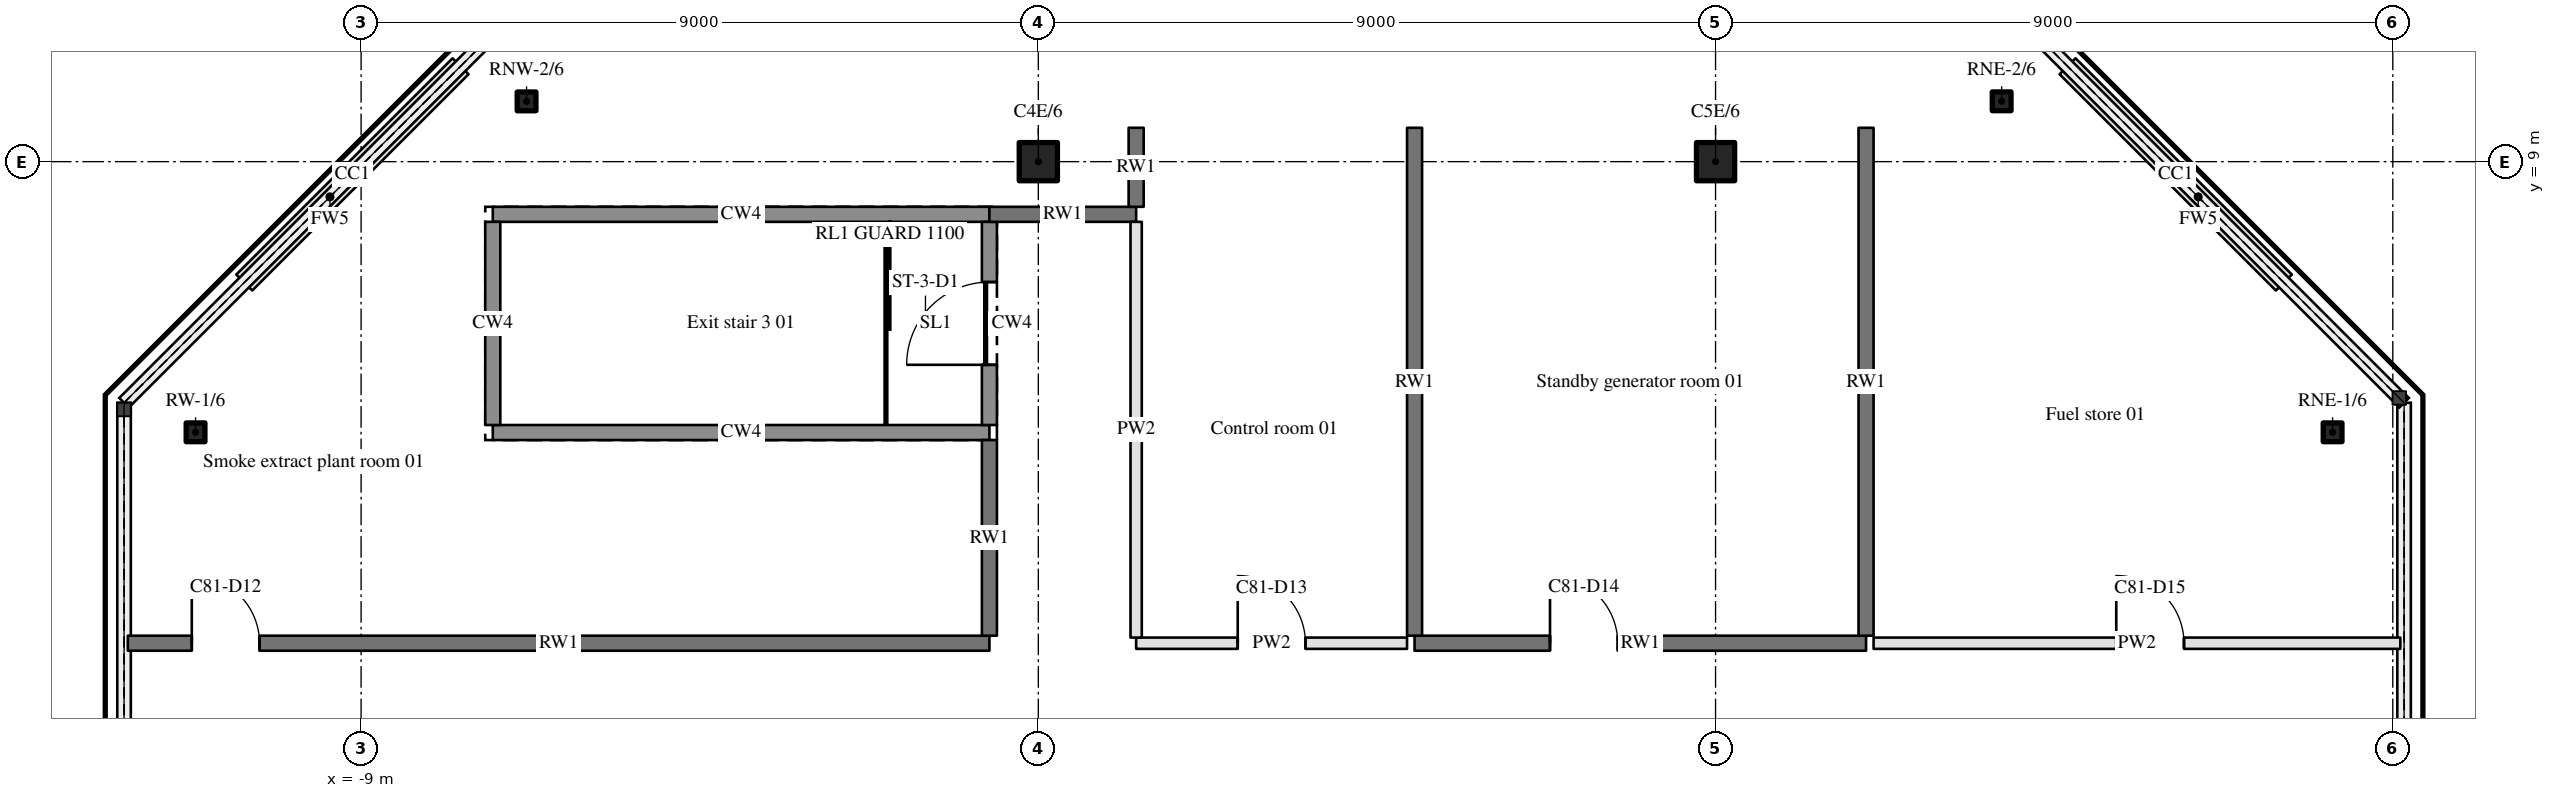
"""IFC4 building model, lengths in metres.
Left out: names, types, materials, properties, quantities, classifications, styles, units other than length and angle.
Written with IfcOpenShell. Run it as: python <this file> out.ifc"""

import sys

from ifc_helpers import new_model, si_unit, direction, frame, frame_2d, origin, origin_2d, place, context, subcontext, project, spatial, rectangle, hollow_rectangle, hollow_circle, extrude, element, fill, save


model = new_model("IFC4")
c1 = context("Model", 3, precision=1e-05, world=origin(), true_north=direction((0.0, 1.0)))
c2 = subcontext(c1, "Body", "Model", "MODEL_VIEW")
j1 = project(units=[si_unit("LENGTHUNIT", "METRE"), si_unit("PLANEANGLEUNIT", "RADIAN")], contexts=[c1])
p1 = place(None, origin())
s1 = spatial("IfcSite", under=j1, at=p1, CompositionType="ELEMENT")
p2 = place(p1, origin())
s2 = spatial("IfcBuilding", under=s1, at=p2, CompositionType="ELEMENT")
p3 = place(p2, frame((0.0, 0.0, 300.9)))
s3 = spatial("IfcBuildingStorey", under=s2, at=p3, CompositionType="ELEMENT", Elevation=300.9)
for number, where, z_axis, x_axis in (
    (1, (0.0, 9.0, 0.0), (0.0, 0.0, 1.0), (1.0, 0.0, 0.0)),
    (2, (9.0, 9.0, 0.0), (0.0, 0.0, 1.0), (1.0, 0.0, 0.0)),
):
    element("IfcColumn", number, at=place(p3, frame(where, z_axis=z_axis, x_axis=x_axis)), inside=s3, PredefinedType="COLUMN", context=c2, shape_type="SweptSolid", body=[
        extrude(hollow_circle(Radius=0.254, WallThickness=0.025, at=origin_2d()), origin(), (0.0, 0.0, 1.0), 3.6),
    ])
p4 = place(p3, frame((17.2, 5.403, 0.0), z_axis=(0.0, 0.0, 1.0), x_axis=(1.0, 0.0, 0.0)))
e3 = element("IfcColumn", 3, at=p4, inside=s3, PredefinedType="COLUMN", context=c2, shape_type="SweptSolid", body=[
    extrude(hollow_rectangle(XDim=0.25, YDim=0.25, WallThickness=0.02, InnerFilletRadius=0.03, OuterFilletRadius=0.05, at=origin_2d()), origin(), (0.0, 0.0, 1.0), 3.6),
])
p5 = place(p3, frame((12.802, 9.802, 0.0), z_axis=(0.0, 0.0, 1.0), x_axis=(1.0, 0.0, 0.0)))
e4 = element("IfcColumn", 4, at=p5, inside=s3, PredefinedType="COLUMN", context=c2, shape_type="SweptSolid", body=[
    extrude(hollow_rectangle(XDim=0.25, YDim=0.25, WallThickness=0.02, InnerFilletRadius=0.03, OuterFilletRadius=0.05, at=origin_2d()), origin(), (0.0, 0.0, 1.0), 3.253),
])
p6 = place(p3, frame((-6.801, 9.801, 0.0), z_axis=(0.0, 0.0, 1.0), x_axis=(1.0, 0.0, 0.0)))
e5 = element("IfcColumn", 5, at=p6, inside=s3, PredefinedType="COLUMN", context=c2, shape_type="SweptSolid", body=[
    extrude(hollow_rectangle(XDim=0.25, YDim=0.25, WallThickness=0.02, InnerFilletRadius=0.03, OuterFilletRadius=0.05, at=origin_2d()), origin(), (0.0, 0.0, 1.0), 3.254),
])
p7 = place(p3, frame((-11.2, 5.403, 0.0), z_axis=(0.0, 0.0, 1.0), x_axis=(1.0, 0.0, 0.0)))
e6 = element("IfcColumn", 6, at=p7, inside=s3, PredefinedType="COLUMN", context=c2, shape_type="SweptSolid", body=[
    extrude(hollow_rectangle(XDim=0.25, YDim=0.25, WallThickness=0.02, InnerFilletRadius=0.03, OuterFilletRadius=0.05, at=origin_2d()), origin(), (0.0, 0.0, 1.0), 3.6),
])
p8 = place(p3, frame((-12.1, 2.6, 0.0), z_axis=(0.0, 0.0, 1.0), x_axis=(1.0, 0.0, 0.0)))
e7 = element("IfcWall", 7, at=p8, inside=s3, PredefinedType="SOLIDWALL", context=c2, shape_type="SweptSolid", body=[
    extrude(rectangle(XDim=11.45, YDim=0.2, at=frame_2d((5.725, 0.0))), origin(), (0.0, 0.0, 1.0), 2.66),
])
p9 = place(p8, frame((0.85, 0.0, 0.0)))
e8 = element("IfcOpeningElement", 8, at=p9, cuts=e7, PredefinedType="OPENING", context=c2, shape_type="SweptSolid", body=[
    extrude(rectangle(XDim=0.9, YDim=2.1, at=frame_2d((0.45, 1.05))), frame((0.0, 0.11, 0.0), z_axis=(0.0, -1.0, 0.0), x_axis=(1.0, 0.0, 0.0)), (0.0, 0.0, 1.0), 0.22),
])
p10 = place(p3, frame((1.3, 2.6, 0.0), z_axis=(0.0, 0.0, 1.0), x_axis=(1.0, 0.0, 0.0)))
e9 = element("IfcWall", 9, at=p10, inside=s3, PredefinedType="PARTITIONING", context=c2, shape_type="SweptSolid", body=[
    extrude(rectangle(XDim=3.6, YDim=0.15, at=frame_2d((1.8, 0.0))), origin(), (0.0, 0.0, 1.0), 2.66),
])
p11 = place(p10, frame((1.35, 0.0, 0.0)))
e10 = element("IfcOpeningElement", 10, at=p11, cuts=e9, PredefinedType="OPENING", context=c2, shape_type="SweptSolid", body=[
    extrude(rectangle(XDim=0.9, YDim=2.1, at=frame_2d((0.45, 1.05))), frame((0.0, 0.085, 0.0), z_axis=(0.0, -1.0, 0.0), x_axis=(1.0, 0.0, 0.0)), (0.0, 0.0, 1.0), 0.17),
])
p12 = place(p3, frame((5.0, 2.6, 0.0), z_axis=(0.0, 0.0, 1.0), x_axis=(1.0, 0.0, 0.0)))
e11 = element("IfcWall", 11, at=p12, inside=s3, PredefinedType="SOLIDWALL", context=c2, shape_type="SweptSolid", body=[
    extrude(rectangle(XDim=6.0, YDim=0.2, at=frame_2d((3.0, 0.0))), origin(), (0.0, 0.0, 1.0), 2.66),
])
p13 = place(p12, frame((1.8, 0.0, 0.0)))
e12 = element("IfcOpeningElement", 12, at=p13, cuts=e11, PredefinedType="OPENING", context=c2, shape_type="SweptSolid", body=[
    extrude(rectangle(XDim=0.9, YDim=2.1, at=frame_2d((0.45, 1.05))), frame((0.0, 0.11, 0.0), z_axis=(0.0, -1.0, 0.0), x_axis=(1.0, 0.0, 0.0)), (0.0, 0.0, 1.0), 0.22),
])
p14 = place(p3, frame((11.1, 2.6, 0.0), z_axis=(0.0, 0.0, 1.0), x_axis=(1.0, 0.0, 0.0)))
e13 = element("IfcWall", 13, at=p14, inside=s3, PredefinedType="PARTITIONING", context=c2, shape_type="SweptSolid", body=[
    extrude(rectangle(XDim=7.0, YDim=0.15, at=frame_2d((3.5, 0.0))), origin(), (0.0, 0.0, 1.0), 2.66),
])
p15 = place(p14, frame((3.225, 0.0, 0.0)))
e14 = element("IfcOpeningElement", 14, at=p15, cuts=e13, PredefinedType="OPENING", context=c2, shape_type="SweptSolid", body=[
    extrude(rectangle(XDim=0.9, YDim=2.1, at=frame_2d((0.45, 1.05))), frame((0.0, 0.085, 0.0), z_axis=(0.0, -1.0, 0.0), x_axis=(1.0, 0.0, 0.0)), (0.0, 0.0, 1.0), 0.17),
])
for number, where, z_axis, x_axis in (
    (15, (-7.25, 5.4, 0.0), (0.0, 0.0, 1.0), (1.0, 0.0, 0.0)),
    (16, (-7.25, 8.3, 0.0), (0.0, 0.0, 1.0), (1.0, 0.0, 0.0)),
):
    element("IfcWall", number, at=place(p3, frame(where, z_axis=z_axis, x_axis=x_axis)), inside=s3, PredefinedType="SHEAR", context=c2, shape_type="SweptSolid", body=[
        extrude(rectangle(XDim=6.6, YDim=0.2, at=frame_2d((3.3, 0.0))), origin(), (0.0, 0.0, 1.0), 3.6),
    ])
p16 = place(p3, frame((-0.65, 8.3, 0.0), z_axis=(0.0, 0.0, 1.0), x_axis=(1.0, 0.0, 0.0)))
e17 = element("IfcWall", 17, at=p16, inside=s3, PredefinedType="SOLIDWALL", context=c2, shape_type="SweptSolid", body=[
    extrude(rectangle(XDim=1.95, YDim=0.2, at=frame_2d((0.975, 0.0))), origin(), (0.0, 0.0, 1.0), 2.66),
])
p17 = place(p3, frame((-7.25, 5.5, 0.0), z_axis=(0.0, 0.0, 1.0), x_axis=(0.0, 1.0, 0.0)))
e18 = element("IfcWall", 18, at=p17, inside=s3, PredefinedType="SHEAR", context=c2, shape_type="SweptSolid", body=[
    extrude(rectangle(XDim=2.7, YDim=0.2, at=frame_2d((1.35, 0.0))), origin(), (0.0, 0.0, 1.0), 3.6),
])
p18 = place(p3, frame((-0.65, 2.7, 0.0), z_axis=(0.0, 0.0, 1.0), x_axis=(0.0, 1.0, 0.0)))
e19 = element("IfcWall", 19, at=p18, inside=s3, PredefinedType="SOLIDWALL", context=c2, shape_type="SweptSolid", body=[
    extrude(rectangle(XDim=2.6, YDim=0.2, at=frame_2d((1.3, 0.0))), origin(), (0.0, 0.0, 1.0), 2.66),
])
p19 = place(p3, frame((-0.65, 5.5, 0.0), z_axis=(0.0, 0.0, 1.0), x_axis=(0.0, 1.0, 0.0)))
e20 = element("IfcWall", 20, at=p19, inside=s3, PredefinedType="SHEAR", context=c2, shape_type="SweptSolid", body=[
    extrude(rectangle(XDim=2.7, YDim=0.2, at=frame_2d((1.35, 0.0))), origin(), (0.0, 0.0, 1.0), 3.6),
])
p20 = place(p19, frame((0.8, 0.0, 0.0)))
e21 = element("IfcOpeningElement", 21, at=p20, cuts=e20, PredefinedType="OPENING", context=c2, shape_type="SweptSolid", body=[
    extrude(rectangle(XDim=1.1, YDim=2.1, at=frame_2d((0.55, 1.05))), frame((0.0, 0.11, 0.0), z_axis=(0.0, -1.0, 0.0), x_axis=(1.0, 0.0, 0.0)), (0.0, 0.0, 1.0), 0.22),
])
p21 = place(p3, frame((1.3, 2.675, 0.0), z_axis=(0.0, 0.0, 1.0), x_axis=(0.0, 1.0, 0.0)))
e22 = element("IfcWall", 22, at=p21, inside=s3, PredefinedType="PARTITIONING", context=c2, shape_type="SweptSolid", body=[
    extrude(rectangle(XDim=5.525, YDim=0.15, at=frame_2d((2.762, 0.0))), origin(), (0.0, 0.0, 1.0), 2.66),
])
p22 = place(p3, frame((1.3, 8.4, 0.0), z_axis=(0.0, 0.0, 1.0), x_axis=(0.0, 1.0, 0.0)))
e23 = element("IfcWall", 23, at=p22, inside=s3, PredefinedType="SOLIDWALL", context=c2, shape_type="SweptSolid", body=[
    extrude(rectangle(XDim=1.05, YDim=0.2, at=frame_2d((0.525, 0.0))), origin(), (0.0, 0.0, 1.0), 2.66),
])
for number, where, z_axis, x_axis in (
    (24, (5.0, 2.7, 0.0), (0.0, 0.0, 1.0), (0.0, 1.0, 0.0)),
    (25, (11.0, 2.7, 0.0), (0.0, 0.0, 1.0), (0.0, 1.0, 0.0)),
):
    element("IfcWall", number, at=place(p3, frame(where, z_axis=z_axis, x_axis=x_axis)), inside=s3, PredefinedType="SOLIDWALL", context=c2, shape_type="SweptSolid", body=[
        extrude(rectangle(XDim=6.75, YDim=0.2, at=frame_2d((3.375, 0.0))), origin(), (0.0, 0.0, 1.0), 2.66),
    ])
p23 = place(p20, origin())
e26 = element("IfcDoor", 26, at=p23, inside=s3, OperationType="SINGLE_SWING_LEFT", PredefinedType="DOOR", context=c2, shape_type="SweptSolid", body=[
    extrude(rectangle(XDim=1.1, YDim=2.1, at=frame_2d((0.55, 1.05))), frame((0.0, 0.025, 0.0), z_axis=(0.0, -1.0, 0.0), x_axis=(1.0, 0.0, 0.0)), (0.0, 0.0, 1.0), 0.05),
])
fill(e21, e26)
p24 = place(p9, origin())
e27 = element("IfcDoor", 27, at=p24, inside=s3, OperationType="SINGLE_SWING_LEFT", PredefinedType="DOOR", context=c2, shape_type="SweptSolid", body=[
    extrude(rectangle(XDim=0.9, YDim=2.1, at=frame_2d((0.45, 1.05))), frame((0.0, 0.025, 0.0), z_axis=(0.0, -1.0, 0.0), x_axis=(1.0, 0.0, 0.0)), (0.0, 0.0, 1.0), 0.05),
])
fill(e8, e27)
p25 = place(p11, origin())
e28 = element("IfcDoor", 28, at=p25, inside=s3, OperationType="SINGLE_SWING_LEFT", PredefinedType="DOOR", context=c2, shape_type="SweptSolid", body=[
    extrude(rectangle(XDim=0.9, YDim=2.1, at=frame_2d((0.45, 1.05))), frame((0.0, 0.025, 0.0), z_axis=(0.0, -1.0, 0.0), x_axis=(1.0, 0.0, 0.0)), (0.0, 0.0, 1.0), 0.05),
])
fill(e10, e28)
p26 = place(p13, origin())
e29 = element("IfcDoor", 29, at=p26, inside=s3, OperationType="SINGLE_SWING_LEFT", PredefinedType="DOOR", context=c2, shape_type="SweptSolid", body=[
    extrude(rectangle(XDim=0.9, YDim=2.1, at=frame_2d((0.45, 1.05))), frame((0.0, 0.025, 0.0), z_axis=(0.0, -1.0, 0.0), x_axis=(1.0, 0.0, 0.0)), (0.0, 0.0, 1.0), 0.05),
])
fill(e12, e29)
p27 = place(p15, origin())
e30 = element("IfcDoor", 30, at=p27, inside=s3, OperationType="SINGLE_SWING_LEFT", PredefinedType="DOOR", context=c2, shape_type="SweptSolid", body=[
    extrude(rectangle(XDim=0.9, YDim=2.1, at=frame_2d((0.45, 1.05))), frame((0.0, 0.025, 0.0), z_axis=(0.0, -1.0, 0.0), x_axis=(1.0, 0.0, 0.0)), (0.0, 0.0, 1.0), 0.05),
])
fill(e14, e30)
save(model, sys.argv[1])
